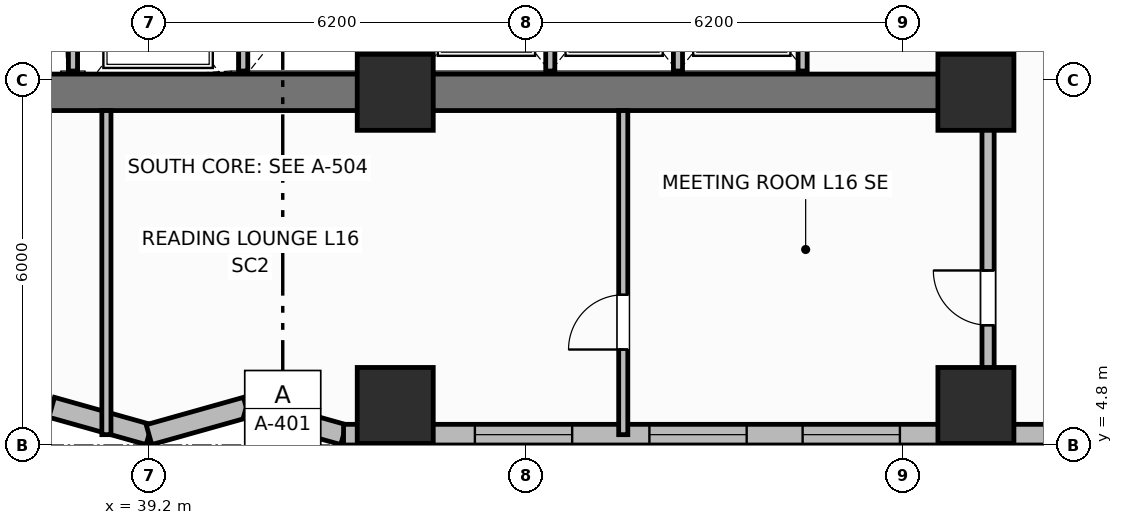
"""IFC4 building model, lengths in metres.
Left out: names, types, materials, properties, quantities, classifications, styles, units other than length and angle.
Written with IfcOpenShell. Run it as: python <this file> out.ifc"""

import sys

from ifc_helpers import new_model, si_unit, direction, frame, frame_2d, origin, origin_2d, place, context, subcontext, project, spatial, rectangle, extrude, element, fill, save


model = new_model("IFC4")
c1 = context("Model", 3, precision=1e-05, world=origin(), true_north=direction((0.0, 1.0)))
c2 = subcontext(c1, "Body", "Model", "MODEL_VIEW")
j1 = project(units=[si_unit("LENGTHUNIT", "METRE"), si_unit("PLANEANGLEUNIT", "RADIAN")], contexts=[c1])
p1 = place(None, origin())
s1 = spatial("IfcSite", under=j1, at=p1, CompositionType="ELEMENT")
p2 = place(p1, origin())
s2 = spatial("IfcBuilding", under=s1, at=p2, CompositionType="ELEMENT")
p3 = place(p2, frame((0.0, 0.0, 65.8)))
s3 = spatial("IfcBuildingStorey", under=s2, at=p3, CompositionType="ELEMENT", Elevation=65.8)
p4 = place(p3, frame((52.8, 10.6, 0.0), z_axis=(0.0, 0.0, 1.0), x_axis=(-1.0, 0.0, 0.0)))
e1 = element("IfcWall", 1, at=p4, inside=s3, PredefinedType="SHEAR", context=c2, shape_type="SweptSolid", body=[
    extrude(rectangle(XDim=27.2, YDim=0.6, at=frame_2d((13.6, 0.0))), origin(), (0.0, 0.0, 1.0), 3.7),
])
p5 = place(p3, frame((52.8, 10.9, 0.0), z_axis=(0.0, 0.0, 1.0), x_axis=(0.0, 1.0, 0.0)))
e2 = element("IfcWall", 2, at=p5, inside=s3, PredefinedType="SHEAR", context=c2, shape_type="SweptSolid", body=[
    extrude(rectangle(XDim=5.6, YDim=0.6, at=frame_2d((2.8, 0.0))), origin(), (0.0, 0.0, 1.0), 3.7),
])
p6 = place(p3, frame((43.25, 10.9, 0.0), z_axis=(0.0, 0.0, 1.0), x_axis=(0.0, 1.0, 0.0)))
e3 = element("IfcWall", 3, at=p6, inside=s3, PredefinedType="SHEAR", context=c2, shape_type="SweptSolid", body=[
    extrude(rectangle(XDim=5.6, YDim=0.4, at=frame_2d((2.8, 0.0))), origin(), (0.0, 0.0, 1.0), 3.7),
])
for number, where, z_axis, x_axis in (
    (4, (43.25, 10.6, 0.0), (0.0, 0.0, 1.0), (1.0, 0.0, 0.0)),
    (5, (52.8, 10.6, 0.0), (0.0, 0.0, 1.0), (1.0, 0.0, 0.0)),
    (6, (43.25, 5.45, 0.0), (0.0, 0.0, 1.0), (1.0, 0.0, 0.0)),
    (7, (52.8, 5.45, 0.0), (0.0, 0.0, 1.0), (1.0, 0.0, 0.0)),
):
    element("IfcColumn", number, at=place(p3, frame(where, z_axis=z_axis, x_axis=x_axis)), inside=s3, PredefinedType="COLUMN", context=c2, shape_type="SweptSolid", body=[
        extrude(rectangle(XDim=1.25, YDim=1.25, at=origin_2d()), origin(), (0.0, 0.0, 1.0), 3.7),
    ])
p7 = place(p3, frame((36.0, 4.97, 0.0), z_axis=(0.0, 0.0, 1.0), x_axis=(0.962662902433, 0.270703040766, 0.0)))
e8 = element("IfcWall", 8, at=p7, inside=s3, PredefinedType="SOLIDWALL", context=c2, shape_type="SweptSolid", body=[
    extrude(rectangle(XDim=1.662, YDim=0.34, at=frame_2d((0.831, 0.0))), origin(), (0.0, 0.0, 1.0), 2.7),
])
p8 = place(p3, frame((37.6, 5.42, 0.0), z_axis=(0.0, 0.0, 1.0), x_axis=(0.962652136636, -0.270741322725, 0.0)))
e9 = element("IfcWall", 9, at=p8, inside=s3, PredefinedType="SOLIDWALL", context=c2, shape_type="SweptSolid", body=[
    extrude(rectangle(XDim=1.662, YDim=0.34, at=frame_2d((0.831, 0.0))), origin(), (0.0, 0.0, 1.0), 2.7),
])
p9 = place(p3, frame((39.2, 4.97, 0.0), z_axis=(0.0, 0.0, 1.0), x_axis=(0.962662902433, 0.270703040766, 0.0)))
e10 = element("IfcWall", 10, at=p9, inside=s3, PredefinedType="SOLIDWALL", context=c2, shape_type="SweptSolid", body=[
    extrude(rectangle(XDim=1.662, YDim=0.34, at=frame_2d((0.831, 0.0))), origin(), (0.0, 0.0, 1.0), 2.7),
])
p10 = place(p3, frame((40.8, 5.42, 0.0), z_axis=(0.0, 0.0, 1.0), x_axis=(0.962652136636, -0.270741322725, 0.0)))
e11 = element("IfcWall", 11, at=p10, inside=s3, PredefinedType="SOLIDWALL", context=c2, shape_type="SweptSolid", body=[
    extrude(rectangle(XDim=1.662, YDim=0.34, at=frame_2d((0.831, 0.0))), origin(), (0.0, 0.0, 1.0), 2.7),
])
p11 = place(p3, frame((42.4, 4.97, 0.0), z_axis=(0.0, 0.0, 1.0), x_axis=(1.0, 0.0, 0.0)))
e12 = element("IfcWall", 12, at=p11, inside=s3, PredefinedType="SOLIDWALL", context=c2, shape_type="SweptSolid", body=[
    extrude(rectangle(XDim=17.4, YDim=0.34, at=frame_2d((8.7, 0.0))), origin(), (0.0, 0.0, 1.0), 2.7),
])
p12 = place(p11, frame((2.16, 0.0, 0.68)))
e13 = element("IfcOpeningElement", 13, at=p12, cuts=e12, PredefinedType="OPENING", context=c2, shape_type="SweptSolid", body=[
    extrude(rectangle(XDim=1.6, YDim=1.9, at=frame_2d((0.8, 0.95))), frame((0.0, 0.18, 0.0), z_axis=(0.0, -1.0, 0.0), x_axis=(1.0, 0.0, 0.0)), (0.0, 0.0, 1.0), 0.36),
])
p13 = place(p11, frame((5.03, 0.0, 0.68)))
e14 = element("IfcOpeningElement", 14, at=p13, cuts=e12, PredefinedType="OPENING", context=c2, shape_type="SweptSolid", body=[
    extrude(rectangle(XDim=1.6, YDim=1.9, at=frame_2d((0.8, 0.95))), frame((0.0, 0.18, 0.0), z_axis=(0.0, -1.0, 0.0), x_axis=(1.0, 0.0, 0.0)), (0.0, 0.0, 1.0), 0.36),
])
p14 = place(p11, frame((7.55, 0.0, 0.68)))
e15 = element("IfcOpeningElement", 15, at=p14, cuts=e12, PredefinedType="OPENING", context=c2, shape_type="SweptSolid", body=[
    extrude(rectangle(XDim=1.6, YDim=1.9, at=frame_2d((0.8, 0.95))), frame((0.0, 0.18, 0.0), z_axis=(0.0, -1.0, 0.0), x_axis=(1.0, 0.0, 0.0)), (0.0, 0.0, 1.0), 0.36),
])
p15 = place(p11, frame((14.34, 0.0, 0.68)))
e16 = element("IfcOpeningElement", 16, at=p15, cuts=e12, PredefinedType="OPENING", context=c2, shape_type="SweptSolid", body=[
    extrude(rectangle(XDim=1.6, YDim=1.9, at=frame_2d((0.8, 0.95))), frame((0.0, 0.18, 0.0), z_axis=(0.0, -1.0, 0.0), x_axis=(1.0, 0.0, 0.0)), (0.0, 0.0, 1.0), 0.36),
])
for number, where, z_axis, x_axis in (
    (17, (37.95, 10.95, 0.0), (0.0, 0.0, 1.0), (0.0, 1.0, 0.0)),
    (18, (40.75, 10.95, 0.0), (0.0, 0.0, 1.0), (0.0, 1.0, 0.0)),
):
    element("IfcWall", number, at=place(p3, frame(where, z_axis=z_axis, x_axis=x_axis)), inside=s3, PredefinedType="PARTITIONING", context=c2, shape_type="SweptSolid", body=[
        extrude(rectangle(XDim=2.75, YDim=0.15, at=frame_2d((1.375, 0.0))), origin(), (0.0, 0.0, 1.0), 2.53),
    ])
for number, where, z_axis, x_axis in (
    (19, (45.8, 10.95, 0.0), (0.0, 0.0, 1.0), (0.0, 1.0, 0.0)),
    (20, (47.9, 10.95, 0.0), (0.0, 0.0, 1.0), (0.0, 1.0, 0.0)),
    (21, (49.95, 10.95, 0.0), (0.0, 0.0, 1.0), (0.0, 1.0, 0.0)),
):
    element("IfcWall", number, at=place(p3, frame(where, z_axis=z_axis, x_axis=x_axis)), inside=s3, PredefinedType="PARTITIONING", context=c2, shape_type="SweptSolid", body=[
        extrude(rectangle(XDim=2.7, YDim=0.15, at=frame_2d((1.35, 0.0))), origin(), (0.0, 0.0, 1.0), 2.53),
    ])
p16 = place(p3, frame((38.5, 4.97, 0.0), z_axis=(0.0, 0.0, 1.0), x_axis=(0.0, 1.0, 0.0)))
e22 = element("IfcWall", 22, at=p16, inside=s3, PredefinedType="PARTITIONING", context=c2, shape_type="SweptSolid", body=[
    extrude(rectangle(XDim=5.33, YDim=0.15, at=frame_2d((2.665, 0.0))), origin(), (0.0, 0.0, 1.0), 2.53),
])
p17 = place(p3, frame((47.0, 4.97, 0.0), z_axis=(0.0, 0.0, 1.0), x_axis=(0.0, 1.0, 0.0)))
e23 = element("IfcWall", 23, at=p17, inside=s3, PredefinedType="PARTITIONING", context=c2, shape_type="SweptSolid", body=[
    extrude(rectangle(XDim=5.33, YDim=0.15, at=frame_2d((2.665, 0.0))), origin(), (0.0, 0.0, 1.0), 2.53),
])
p18 = place(p17, frame((1.4, 0.0, 0.0)))
e24 = element("IfcOpeningElement", 24, at=p18, cuts=e23, PredefinedType="OPENING", context=c2, shape_type="SweptSolid", body=[
    extrude(rectangle(XDim=0.9, YDim=2.1, at=frame_2d((0.45, 1.05))), frame((0.0, 0.085, 0.0), z_axis=(0.0, -1.0, 0.0), x_axis=(1.0, 0.0, 0.0)), (0.0, 0.0, 1.0), 0.17),
])
p19 = place(p3, frame((53.0, 5.72, 0.0), z_axis=(0.0, 0.0, 1.0), x_axis=(0.0, 1.0, 0.0)))
e25 = element("IfcWall", 25, at=p19, inside=s3, PredefinedType="PARTITIONING", context=c2, shape_type="SweptSolid", body=[
    extrude(rectangle(XDim=4.58, YDim=0.2, at=frame_2d((2.29, 0.0))), origin(), (0.0, 0.0, 1.0), 2.53),
])
p20 = place(p19, frame((1.05, 0.0, 0.0)))
e26 = element("IfcOpeningElement", 26, at=p20, cuts=e25, PredefinedType="OPENING", context=c2, shape_type="SweptSolid", body=[
    extrude(rectangle(XDim=0.9, YDim=2.1, at=frame_2d((0.45, 1.05))), frame((0.0, 0.11, 0.0), z_axis=(0.0, -1.0, 0.0), x_axis=(1.0, 0.0, 0.0)), (0.0, 0.0, 1.0), 0.22),
])
p21 = place(p12, origin())
e27 = element("IfcWindow", 27, at=p21, inside=s3, PartitioningType="SINGLE_PANEL", PredefinedType="WINDOW", context=c2, shape_type="SweptSolid", body=[
    extrude(rectangle(XDim=1.6, YDim=1.9, at=frame_2d((0.8, 0.95))), frame((0.0, 0.03, 0.0), z_axis=(0.0, -1.0, 0.0), x_axis=(1.0, 0.0, 0.0)), (0.0, 0.0, 1.0), 0.06),
])
fill(e13, e27)
p22 = place(p13, origin())
e28 = element("IfcWindow", 28, at=p22, inside=s3, PartitioningType="SINGLE_PANEL", PredefinedType="WINDOW", context=c2, shape_type="SweptSolid", body=[
    extrude(rectangle(XDim=1.6, YDim=1.9, at=frame_2d((0.8, 0.95))), frame((0.0, 0.03, 0.0), z_axis=(0.0, -1.0, 0.0), x_axis=(1.0, 0.0, 0.0)), (0.0, 0.0, 1.0), 0.06),
])
fill(e14, e28)
p23 = place(p14, origin())
e29 = element("IfcWindow", 29, at=p23, inside=s3, PartitioningType="SINGLE_PANEL", PredefinedType="WINDOW", context=c2, shape_type="SweptSolid", body=[
    extrude(rectangle(XDim=1.6, YDim=1.9, at=frame_2d((0.8, 0.95))), frame((0.0, 0.03, 0.0), z_axis=(0.0, -1.0, 0.0), x_axis=(1.0, 0.0, 0.0)), (0.0, 0.0, 1.0), 0.06),
])
fill(e15, e29)
p24 = place(p18, origin())
e30 = element("IfcDoor", 30, at=p24, inside=s3, OperationType="SINGLE_SWING_LEFT", PredefinedType="DOOR", context=c2, shape_type="SweptSolid", body=[
    extrude(rectangle(XDim=0.9, YDim=2.1, at=frame_2d((0.45, 1.05))), frame((0.0, 0.025, 0.0), z_axis=(0.0, -1.0, 0.0), x_axis=(1.0, 0.0, 0.0)), (0.0, 0.0, 1.0), 0.05),
])
fill(e24, e30)
p25 = place(p20, origin())
e31 = element("IfcDoor", 31, at=p25, inside=s3, OperationType="SINGLE_SWING_RIGHT", PredefinedType="DOOR", context=c2, shape_type="SweptSolid", body=[
    extrude(rectangle(XDim=0.9, YDim=2.1, at=frame_2d((0.45, 1.05))), frame((0.0, 0.025, 0.0), z_axis=(0.0, -1.0, 0.0), x_axis=(1.0, 0.0, 0.0)), (0.0, 0.0, 1.0), 0.05),
])
fill(e26, e31)
save(model, sys.argv[1])
